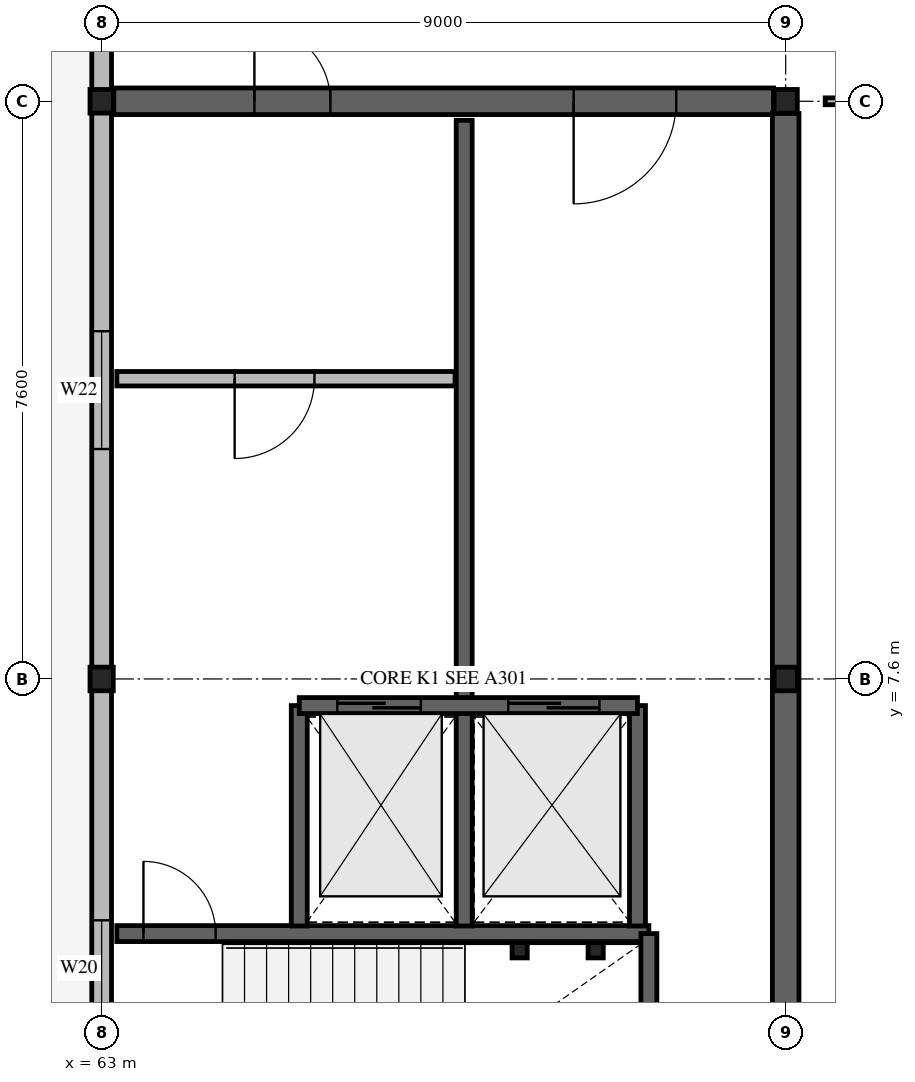
"""IFC4 building model, lengths in metres.
Left out: names, types, materials, properties, quantities, classifications, styles, units other than length and angle.
Written with IfcOpenShell. Run it as: python <this file> out.ifc"""

import sys

from ifc_helpers import new_model, si_unit, direction, frame, frame_2d, origin, origin_2d, place, context, subcontext, project, spatial, rectangle, hollow_rectangle, i_section, extrude, element, fill, save


model = new_model("IFC4")
c1 = context("Model", 3, precision=1e-05, world=origin(), true_north=direction((0.0, 1.0)))
c2 = subcontext(c1, "Body", "Model", "MODEL_VIEW")
j1 = project(units=[si_unit("LENGTHUNIT", "METRE"), si_unit("PLANEANGLEUNIT", "RADIAN")], contexts=[c1])
p1 = place(None, origin())
s1 = spatial("IfcSite", under=j1, at=p1, CompositionType="ELEMENT")
p2 = place(p1, origin())
s2 = spatial("IfcBuilding", under=s1, at=p2, CompositionType="ELEMENT")
p3 = place(p2, frame((0.0, 0.0, 18.0)))
s3 = spatial("IfcBuildingStorey", under=s2, at=p3, CompositionType="ELEMENT", Elevation=18.0)
for number, where, z_axis, x_axis in (
    (1, (63.0, 7.6, 0.0), (0.0, 0.0, 1.0), (1.0, 0.0, 0.0)),
    (2, (63.0, 15.2, 0.0), (0.0, 0.0, 1.0), (1.0, 0.0, 0.0)),
    (3, (72.0, 7.6, 0.0), (0.0, 0.0, 1.0), (1.0, 0.0, 0.0)),
    (4, (72.0, 15.2, 0.0), (0.0, 0.0, 1.0), (1.0, 0.0, 0.0)),
):
    element("IfcColumn", number, at=place(p3, frame(where, z_axis=z_axis, x_axis=x_axis)), inside=s3, PredefinedType="COLUMN", context=c2, shape_type="SweptSolid", body=[
        extrude(i_section(OverallWidth=0.306, OverallDepth=0.311, WebThickness=0.011, FlangeThickness=0.017, FilletRadius=0.015, at=origin_2d()), origin(), (0.0, 0.0, 1.0), 4.32),
    ])
p4 = place(p3, frame((63.0, 0.0, 0.0), z_axis=(0.0, 0.0, 1.0), x_axis=(0.0, 1.0, 0.0)))
e5 = element("IfcWall", 5, at=p4, inside=s3, PredefinedType="STANDARD", context=c2, shape_type="SweptSolid", body=[
    extrude(rectangle(XDim=7.6, YDim=0.26, at=frame_2d((3.8, 0.0))), origin(), (0.0, 0.0, 1.0), 3.599),
])
p5 = place(p4, frame((3.175, 0.0, 0.85)))
e6 = element("IfcOpeningElement", 6, at=p5, cuts=e5, PredefinedType="OPENING", context=c2, shape_type="SweptSolid", body=[
    extrude(rectangle(XDim=1.25, YDim=1.5, at=frame_2d((0.625, 0.75))), frame((0.0, 0.14, 0.0), z_axis=(0.0, -1.0, 0.0), x_axis=(1.0, 0.0, 0.0)), (0.0, 0.0, 1.0), 0.28),
])
p6 = place(p3, frame((63.0, 7.6, 0.0), z_axis=(0.0, 0.0, 1.0), x_axis=(0.0, 1.0, 0.0)))
e7 = element("IfcWall", 7, at=p6, inside=s3, PredefinedType="STANDARD", context=c2, shape_type="SweptSolid", body=[
    extrude(rectangle(XDim=7.6, YDim=0.26, at=frame_2d((3.8, 0.0))), origin(), (0.0, 0.0, 1.0), 3.599),
])
p7 = place(p6, frame((3.025, 0.0, 0.85)))
e8 = element("IfcOpeningElement", 8, at=p7, cuts=e7, PredefinedType="OPENING", context=c2, shape_type="SweptSolid", body=[
    extrude(rectangle(XDim=1.55, YDim=1.5, at=frame_2d((0.775, 0.75))), frame((0.0, 0.14, 0.0), z_axis=(0.0, -1.0, 0.0), x_axis=(1.0, 0.0, 0.0)), (0.0, 0.0, 1.0), 0.28),
])
p8 = place(p3, frame((63.0, 15.2, 0.0), z_axis=(0.0, 0.0, 1.0), x_axis=(0.0, 1.0, 0.0)))
e9 = element("IfcWall", 9, at=p8, inside=s3, PredefinedType="STANDARD", context=c2, shape_type="SweptSolid", body=[
    extrude(rectangle(XDim=7.81, YDim=0.26, at=frame_2d((3.905, 0.0))), origin(), (0.0, 0.0, 1.0), 3.599),
])
p9 = place(p8, frame((3.05, 0.0, 0.0)))
e10 = element("IfcOpeningElement", 10, at=p9, cuts=e9, PredefinedType="OPENING", context=c2, shape_type="SweptSolid", body=[
    extrude(rectangle(XDim=1.5, YDim=2.18, at=frame_2d((0.75, 1.09))), frame((0.0, 0.14, 0.0), z_axis=(0.0, -1.0, 0.0), x_axis=(1.0, 0.0, 0.0)), (0.0, 0.0, 1.0), 0.28),
])
p10 = place(p3, frame((63.16, 15.2, 0.0), z_axis=(0.0, 0.0, 1.0), x_axis=(1.0, 0.0, 0.0)))
e11 = element("IfcWall", 11, at=p10, inside=s3, PredefinedType="SHEAR", context=c2, shape_type="SweptSolid", body=[
    extrude(rectangle(XDim=8.68, YDim=0.35, at=frame_2d((4.34, 0.0))), origin(), (0.0, 0.0, 1.0), 4.04),
])
p11 = place(p10, frame((1.85, 0.0, 0.0)))
e12 = element("IfcOpeningElement", 12, at=p11, cuts=e11, PredefinedType="OPENING", context=c2, shape_type="SweptSolid", body=[
    extrude(rectangle(XDim=1.0, YDim=2.15, at=frame_2d((0.5, 1.075))), frame((0.0, 0.185, 0.0), z_axis=(0.0, -1.0, 0.0), x_axis=(1.0, 0.0, 0.0)), (0.0, 0.0, 1.0), 0.37),
])
p12 = place(p10, frame((6.05, 0.0, 0.0)))
e13 = element("IfcOpeningElement", 13, at=p12, cuts=e11, PredefinedType="OPENING", context=c2, shape_type="SweptSolid", body=[
    extrude(rectangle(XDim=1.35, YDim=2.18, at=frame_2d((0.675, 1.09))), frame((0.0, 0.185, 0.0), z_axis=(0.0, -1.0, 0.0), x_axis=(1.0, 0.0, 0.0)), (0.0, 0.0, 1.0), 0.37),
])
p13 = place(p3, frame((72.0, 0.16, 0.0), z_axis=(0.0, 0.0, 1.0), x_axis=(0.0, 1.0, 0.0)))
e14 = element("IfcWall", 14, at=p13, inside=s3, PredefinedType="SHEAR", context=c2, shape_type="SweptSolid", body=[
    extrude(rectangle(XDim=14.88, YDim=0.35, at=frame_2d((7.44, 0.0))), origin(), (0.0, 0.0, 1.0), 4.04),
])
p14 = place(p3, frame((63.2, 4.25, 0.0), z_axis=(0.0, 0.0, 1.0), x_axis=(1.0, 0.0, 0.0)))
e15 = element("IfcWall", 15, at=p14, inside=s3, PredefinedType="SOLIDWALL", context=c2, shape_type="SweptSolid", body=[
    extrude(rectangle(XDim=7.0, YDim=0.21, at=frame_2d((3.5, 0.0))), origin(), (0.0, 0.0, 1.0), 4.04),
])
p15 = place(p14, frame((0.35, 0.0, 0.0)))
e16 = element("IfcOpeningElement", 16, at=p15, cuts=e15, PredefinedType="OPENING", context=c2, shape_type="SweptSolid", body=[
    extrude(rectangle(XDim=0.95, YDim=2.12, at=frame_2d((0.475, 1.06))), frame((0.0, 0.115, 0.0), z_axis=(0.0, -1.0, 0.0), x_axis=(1.0, 0.0, 0.0)), (0.0, 0.0, 1.0), 0.23),
])
p16 = place(p3, frame((70.2, 0.2, 0.0), z_axis=(0.0, 0.0, 1.0), x_axis=(0.0, 1.0, 0.0)))
e17 = element("IfcWall", 17, at=p16, inside=s3, PredefinedType="SOLIDWALL", context=c2, shape_type="SweptSolid", body=[
    extrude(rectangle(XDim=4.05, YDim=0.21, at=frame_2d((2.025, 0.0))), origin(), (0.0, 0.0, 1.0), 4.04),
])
p17 = place(p3, frame((65.6, 4.35, 0.0), z_axis=(0.0, 0.0, 1.0), x_axis=(0.0, 1.0, 0.0)))
e18 = element("IfcWall", 18, at=p17, inside=s3, PredefinedType="SOLIDWALL", context=c2, shape_type="SweptSolid", body=[
    extrude(rectangle(XDim=2.9, YDim=0.21, at=frame_2d((1.45, 0.0))), origin(), (0.0, 0.0, 1.0), 4.04),
])
p18 = place(p3, frame((67.77, 4.35, 0.0), z_axis=(0.0, 0.0, 1.0), x_axis=(0.0, 1.0, 0.0)))
e19 = element("IfcWall", 19, at=p18, inside=s3, PredefinedType="SOLIDWALL", context=c2, shape_type="SweptSolid", body=[
    extrude(rectangle(XDim=10.6, YDim=0.21, at=frame_2d((5.3, 0.0))), origin(), (0.0, 0.0, 1.0), 4.04),
])
p19 = place(p3, frame((70.05, 4.35, 0.0), z_axis=(0.0, 0.0, 1.0), x_axis=(0.0, 1.0, 0.0)))
e20 = element("IfcWall", 20, at=p19, inside=s3, PredefinedType="SOLIDWALL", context=c2, shape_type="SweptSolid", body=[
    extrude(rectangle(XDim=2.9, YDim=0.21, at=frame_2d((1.45, 0.0))), origin(), (0.0, 0.0, 1.0), 4.04),
])
p20 = place(p3, frame((65.6, 7.25, 0.0), z_axis=(0.0, 0.0, 1.0), x_axis=(1.0, 0.0, 0.0)))
e21 = element("IfcWall", 21, at=p20, inside=s3, PredefinedType="SOLIDWALL", context=c2, shape_type="SweptSolid", body=[
    extrude(rectangle(XDim=4.45, YDim=0.21, at=frame_2d((2.225, 0.0))), origin(), (0.0, 0.0, 1.0), 4.04),
])
p21 = place(p20, frame((0.5, 0.0, 0.0)))
e22 = element("IfcOpeningElement", 22, at=p21, cuts=e21, PredefinedType="OPENING", context=c2, shape_type="SweptSolid", body=[
    extrude(rectangle(XDim=1.1, YDim=2.14, at=frame_2d((0.55, 1.07))), frame((0.0, 0.115, 0.0), z_axis=(0.0, -1.0, 0.0), x_axis=(1.0, 0.0, 0.0)), (0.0, 0.0, 1.0), 0.23),
])
p22 = place(p20, frame((2.75, 0.0, 0.0)))
e23 = element("IfcOpeningElement", 23, at=p22, cuts=e21, PredefinedType="OPENING", context=c2, shape_type="SweptSolid", body=[
    extrude(rectangle(XDim=1.2, YDim=2.18, at=frame_2d((0.6, 1.09))), frame((0.0, 0.115, 0.0), z_axis=(0.0, -1.0, 0.0), x_axis=(1.0, 0.0, 0.0)), (0.0, 0.0, 1.0), 0.23),
])
p23 = place(p3, frame((63.2, 11.55, 0.0), z_axis=(0.0, 0.0, 1.0), x_axis=(1.0, 0.0, 0.0)))
e24 = element("IfcWall", 24, at=p23, inside=s3, PredefinedType="SOLIDWALL", context=c2, shape_type="SweptSolid", body=[
    extrude(rectangle(XDim=4.45, YDim=0.19, at=frame_2d((2.225, 0.0))), origin(), (0.0, 0.0, 1.0), 4.04),
])
p24 = place(p23, frame((1.55, 0.0, 0.0)))
e25 = element("IfcOpeningElement", 25, at=p24, cuts=e24, PredefinedType="OPENING", context=c2, shape_type="SweptSolid", body=[
    extrude(rectangle(XDim=1.05, YDim=2.12, at=frame_2d((0.525, 1.06))), frame((0.0, 0.105, 0.0), z_axis=(0.0, -1.0, 0.0), x_axis=(1.0, 0.0, 0.0)), (0.0, 0.0, 1.0), 0.21),
])
for number, where, z_axis, x_axis in (
    (26, (68.5, 4.03, 0.0), (0.0, 0.0, 1.0), (1.0, 0.0, 0.0)),
    (27, (69.5, 4.03, 0.0), (0.0, 0.0, 1.0), (1.0, 0.0, 0.0)),
):
    element("IfcColumn", number, at=place(p3, frame(where, z_axis=z_axis, x_axis=x_axis)), inside=s3, PredefinedType="COLUMN", context=c2, shape_type="SweptSolid", body=[
        extrude(hollow_rectangle(XDim=0.2, YDim=0.2, WallThickness=0.012, at=origin_2d()), origin(), (0.0, 0.0, 1.0), 4.32),
    ])
p25 = place(p3, frame((72.52, 15.2, 0.0), z_axis=(0.0, 0.0, 1.0), x_axis=(1.0, 0.0, 0.0)))
e28 = element("IfcWall", 28, at=p25, inside=s3, PredefinedType="PARTITIONING", context=c2, shape_type="SweptSolid", body=[
    extrude(rectangle(XDim=16.96, YDim=0.09, at=frame_2d((8.48, 0.0))), origin(), (0.0, 0.0, 1.0), 3.524),
])
p26 = place(p25, frame((6.36, 0.0, 0.0)))
e29 = element("IfcOpeningElement", 29, at=p26, cuts=e28, PredefinedType="OPENING", context=c2, shape_type="SweptSolid", body=[
    extrude(rectangle(XDim=1.04, YDim=2.06, at=frame_2d((0.52, 1.03))), frame((0.0, 0.055, 0.0), z_axis=(0.0, -1.0, 0.0), x_axis=(1.0, 0.0, 0.0)), (0.0, 0.0, 1.0), 0.11),
])
p27 = place(p5, origin())
e30 = element("IfcWindow", 30, at=p27, inside=s3, PartitioningType="SINGLE_PANEL", PredefinedType="WINDOW", context=c2, shape_type="SweptSolid", body=[
    extrude(rectangle(XDim=1.25, YDim=1.5, at=frame_2d((0.625, 0.75))), frame((0.0, 0.03, 0.0), z_axis=(0.0, -1.0, 0.0), x_axis=(1.0, 0.0, 0.0)), (0.0, 0.0, 1.0), 0.06),
])
fill(e6, e30)
p28 = place(p7, origin())
e31 = element("IfcWindow", 31, at=p28, inside=s3, PartitioningType="SINGLE_PANEL", PredefinedType="WINDOW", context=c2, shape_type="SweptSolid", body=[
    extrude(rectangle(XDim=1.55, YDim=1.5, at=frame_2d((0.775, 0.75))), frame((0.0, 0.03, 0.0), z_axis=(0.0, -1.0, 0.0), x_axis=(1.0, 0.0, 0.0)), (0.0, 0.0, 1.0), 0.06),
])
fill(e8, e31)
p29 = place(p15, origin())
e32 = element("IfcDoor", 32, at=p29, inside=s3, OperationType="SINGLE_SWING_LEFT", PredefinedType="DOOR", context=c2, shape_type="SweptSolid", body=[
    extrude(rectangle(XDim=0.95, YDim=2.12, at=frame_2d((0.475, 1.06))), frame((0.0, 0.025, 0.0), z_axis=(0.0, -1.0, 0.0), x_axis=(1.0, 0.0, 0.0)), (0.0, 0.0, 1.0), 0.05),
])
fill(e16, e32)
p30 = place(p21, origin())
e33 = element("IfcDoor", 33, at=p30, inside=s3, OperationType="SLIDING_TO_LEFT", PredefinedType="DOOR", context=c2, shape_type="SweptSolid", body=[
    extrude(rectangle(XDim=1.1, YDim=2.14, at=frame_2d((0.55, 1.07))), frame((0.0, 0.025, 0.0), z_axis=(0.0, -1.0, 0.0), x_axis=(1.0, 0.0, 0.0)), (0.0, 0.0, 1.0), 0.05),
])
fill(e22, e33)
p31 = place(p22, origin())
e34 = element("IfcDoor", 34, at=p31, inside=s3, OperationType="SLIDING_TO_LEFT", PredefinedType="DOOR", context=c2, shape_type="SweptSolid", body=[
    extrude(rectangle(XDim=1.2, YDim=2.18, at=frame_2d((0.6, 1.09))), frame((0.0, 0.025, 0.0), z_axis=(0.0, -1.0, 0.0), x_axis=(1.0, 0.0, 0.0)), (0.0, 0.0, 1.0), 0.05),
])
fill(e23, e34)
p32 = place(p24, origin())
e35 = element("IfcDoor", 35, at=p32, inside=s3, OperationType="SINGLE_SWING_RIGHT", PredefinedType="DOOR", context=c2, shape_type="SweptSolid", body=[
    extrude(rectangle(XDim=1.05, YDim=2.12, at=frame_2d((0.525, 1.06))), frame((0.0, 0.025, 0.0), z_axis=(0.0, -1.0, 0.0), x_axis=(1.0, 0.0, 0.0)), (0.0, 0.0, 1.0), 0.05),
])
fill(e25, e35)
p33 = place(p11, origin())
e36 = element("IfcDoor", 36, at=p33, inside=s3, OperationType="SINGLE_SWING_LEFT", PredefinedType="DOOR", context=c2, shape_type="SweptSolid", body=[
    extrude(rectangle(XDim=1.0, YDim=2.15, at=frame_2d((0.5, 1.075))), frame((0.0, 0.025, 0.0), z_axis=(0.0, -1.0, 0.0), x_axis=(1.0, 0.0, 0.0)), (0.0, 0.0, 1.0), 0.05),
])
fill(e12, e36)
p34 = place(p12, origin())
e37 = element("IfcDoor", 37, at=p34, inside=s3, OperationType="SINGLE_SWING_RIGHT", PredefinedType="DOOR", context=c2, shape_type="SweptSolid", body=[
    extrude(rectangle(XDim=1.35, YDim=2.18, at=frame_2d((0.675, 1.09))), frame((0.0, 0.025, 0.0), z_axis=(0.0, -1.0, 0.0), x_axis=(1.0, 0.0, 0.0)), (0.0, 0.0, 1.0), 0.05),
])
fill(e13, e37)
save(model, sys.argv[1])
